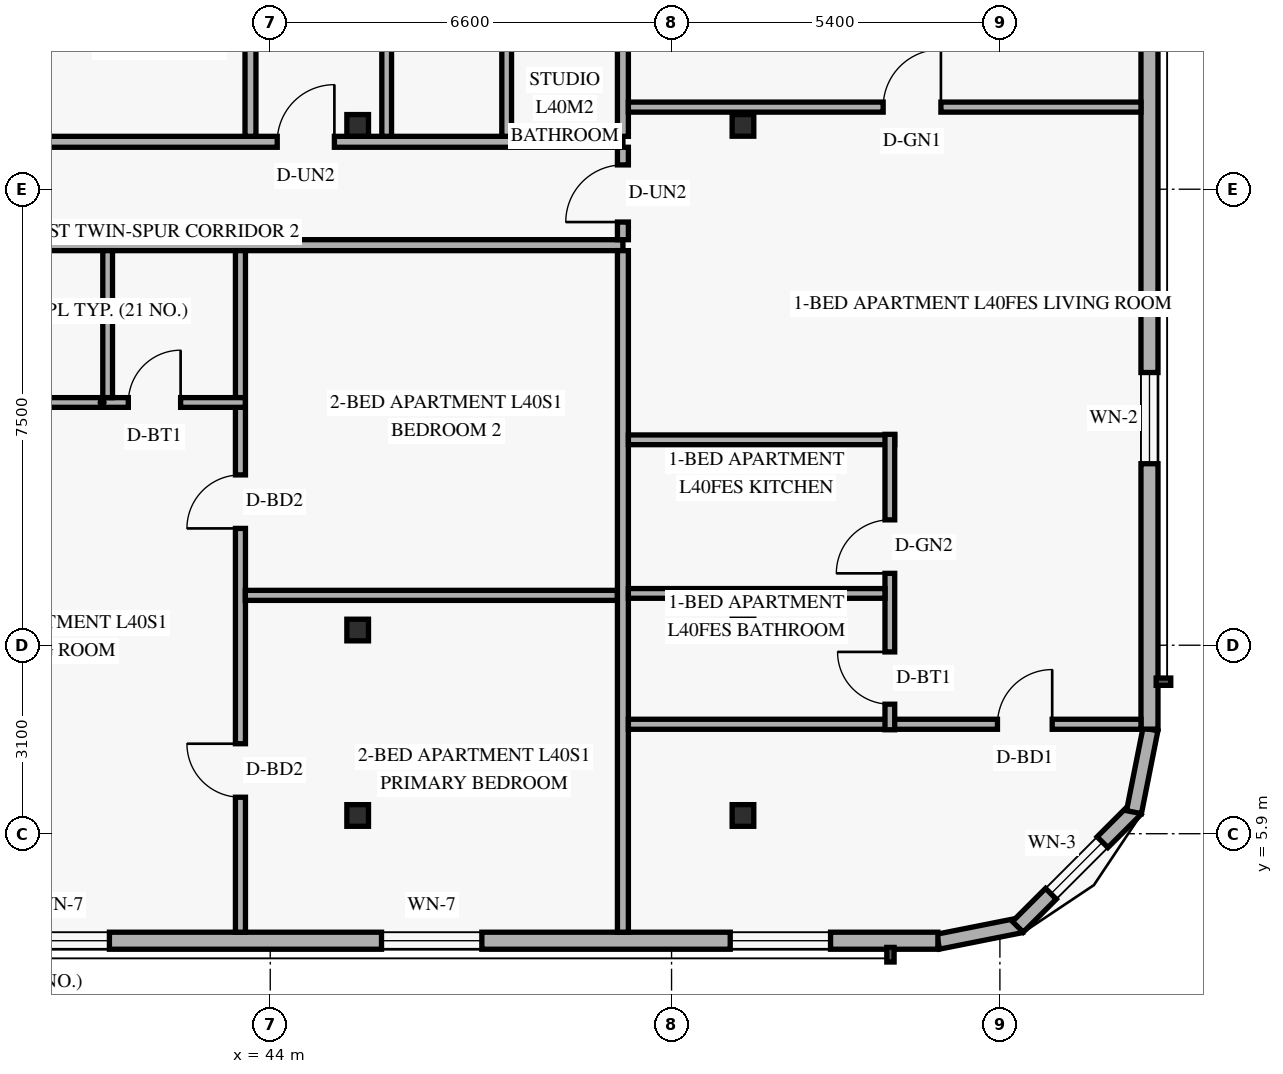
"""IFC4 building model, lengths in metres.
Left out: names, types, materials, properties, quantities, classifications, styles, units other than length and angle.
Written with IfcOpenShell. Run it as: python <this file> out.ifc"""

import sys

from ifc_helpers import new_model, si_unit, direction, frame, frame_2d, origin, origin_2d, place, context, subcontext, project, spatial, rectangle, hollow_rectangle, extrude, element, fill, save


model = new_model("IFC4")
c1 = context("Model", 3, precision=1e-05, world=origin(), true_north=direction((0.0, 1.0)))
c2 = subcontext(c1, "Body", "Model", "MODEL_VIEW")
j1 = project(units=[si_unit("LENGTHUNIT", "METRE"), si_unit("PLANEANGLEUNIT", "RADIAN")], contexts=[c1])
p1 = place(None, origin())
s1 = spatial("IfcSite", under=j1, at=p1, CompositionType="ELEMENT")
p2 = place(p1, origin())
s2 = spatial("IfcBuilding", under=s1, at=p2, CompositionType="ELEMENT")
p3 = place(p2, frame((0.0, 0.0, 155.4)))
s3 = spatial("IfcBuildingStorey", under=s2, at=p3, CompositionType="ELEMENT", Elevation=155.4)
for number, where, z_axis, x_axis in (
    (1, (45.375, 6.2, 0.0), (0.035, 0.0, 0.999), (0.0, 1.0, 0.0)),
    (2, (45.375, 9.25, 0.0), (0.035, 0.0, 0.999), (0.0, 1.0, 0.0)),
    (3, (45.375, 17.55, 0.0), (0.035, 0.0, 0.999), (0.0, 1.0, 0.0)),
):
    element("IfcColumn", number, at=place(p3, frame(where, z_axis=z_axis, x_axis=x_axis)), inside=s3, PredefinedType="COLUMN", context=c2, shape_type="SweptSolid", body=[
        extrude(hollow_rectangle(XDim=0.356, YDim=0.356, WallThickness=0.016, at=origin_2d()), origin(), (0.0, 0.0, 1.0), 3.602),
    ])
for number, where, z_axis, x_axis in (
    (4, (51.67, 6.2, 0.0), (0.058, 0.0, 0.998), (0.0, 1.0, 0.0)),
    (5, (51.67, 9.25, 0.0), (0.058, 0.0, 0.998), (0.0, 1.0, 0.0)),
    (6, (51.67, 17.55, 0.0), (0.058, 0.0, 0.998), (0.0, 1.0, 0.0)),
):
    element("IfcColumn", number, at=place(p3, frame(where, z_axis=z_axis, x_axis=x_axis)), inside=s3, PredefinedType="COLUMN", context=c2, shape_type="SweptSolid", body=[
        extrude(hollow_rectangle(XDim=0.356, YDim=0.356, WallThickness=0.016, at=origin_2d()), origin(), (0.0, 0.0, 1.0), 3.606),
    ])
p4 = place(p3, frame((54.983, 4.124, 0.0), z_axis=(0.0, 0.0, 1.0), x_axis=(0.980809899341, 0.19496651342, 0.0)))
e7 = element("IfcWall", 7, at=p4, inside=s3, PredefinedType="SOLIDWALL", context=c2, shape_type="SweptSolid", body=[
    extrude(rectangle(XDim=1.389, YDim=0.25, at=frame_2d((0.694, 0.0))), origin(), (0.0, 0.0, 1.0), 3.36),
])
p5 = place(p3, frame((56.295, 4.368, 0.0), z_axis=(0.0, 0.0, 1.0), x_axis=(0.707106781187, 0.707106781187, 0.0)))
e8 = element("IfcWall", 8, at=p5, inside=s3, PredefinedType="SOLIDWALL", context=c2, shape_type="SweptSolid", body=[
    extrude(rectangle(XDim=2.739, YDim=0.25, at=frame_2d((1.37, 0.0))), origin(), (0.0, 0.0, 1.0), 3.36),
])
p6 = place(p5, frame((0.77, 0.0, 0.85)))
e9 = element("IfcOpeningElement", 9, at=p6, cuts=e8, PredefinedType="OPENING", context=c2, shape_type="SweptSolid", body=[
    extrude(rectangle(XDim=1.2, YDim=1.5, at=frame_2d((0.6, 0.75))), frame((0.0, 0.135, 0.0), z_axis=(0.0, -1.0, 0.0), x_axis=(1.0, 0.0, 0.0)), (0.0, 0.0, 1.0), 0.27),
])
p7 = place(p3, frame((58.205, 6.254, 0.0), z_axis=(0.0, 0.0, 1.0), x_axis=(0.19496651342, 0.980809899341, 0.0)))
e10 = element("IfcWall", 10, at=p7, inside=s3, PredefinedType="SOLIDWALL", context=c2, shape_type="SweptSolid", body=[
    extrude(rectangle(XDim=1.389, YDim=0.25, at=frame_2d((0.694, 0.0))), origin(), (0.0, 0.0, 1.0), 3.36),
])
p8 = place(p3, frame((21.22, 4.14, 0.0), z_axis=(0.0, 0.0, 1.0), x_axis=(1.0, 0.0, 0.0)))
e11 = element("IfcWall", 11, at=p8, inside=s3, PredefinedType="SOLIDWALL", context=c2, shape_type="SweptSolid", body=[
    extrude(rectangle(XDim=33.76, YDim=0.28, at=frame_2d((16.88, 0.0))), origin(), (0.0, 0.0, 1.0), 3.36),
])
p9 = place(p8, frame((1.98, 0.0, 0.85)))
e12 = element("IfcOpeningElement", 12, at=p9, cuts=e11, PredefinedType="OPENING", context=c2, shape_type="SweptSolid", body=[
    extrude(rectangle(XDim=1.65, YDim=1.6, at=frame_2d((0.825, 0.8))), frame((0.0, 0.15, 0.0), z_axis=(0.0, -1.0, 0.0), x_axis=(1.0, 0.0, 0.0)), (0.0, 0.0, 1.0), 0.3),
])
p10 = place(p8, frame((8.865, 0.0, 0.85)))
e13 = element("IfcOpeningElement", 13, at=p10, cuts=e11, PredefinedType="OPENING", context=c2, shape_type="SweptSolid", body=[
    extrude(rectangle(XDim=1.65, YDim=1.6, at=frame_2d((0.825, 0.8))), frame((0.0, 0.15, 0.0), z_axis=(0.0, -1.0, 0.0), x_axis=(1.0, 0.0, 0.0)), (0.0, 0.0, 1.0), 0.3),
])
p11 = place(p8, frame((14.665, 0.0, 0.85)))
e14 = element("IfcOpeningElement", 14, at=p11, cuts=e11, PredefinedType="OPENING", context=c2, shape_type="SweptSolid", body=[
    extrude(rectangle(XDim=1.2, YDim=1.5, at=frame_2d((0.6, 0.75))), frame((0.0, 0.15, 0.0), z_axis=(0.0, -1.0, 0.0), x_axis=(1.0, 0.0, 0.0)), (0.0, 0.0, 1.0), 0.3),
])
p12 = place(p8, frame((18.485, 0.0, 0.85)))
e15 = element("IfcOpeningElement", 15, at=p12, cuts=e11, PredefinedType="OPENING", context=c2, shape_type="SweptSolid", body=[
    extrude(rectangle(XDim=1.65, YDim=1.6, at=frame_2d((0.825, 0.8))), frame((0.0, 0.15, 0.0), z_axis=(0.0, -1.0, 0.0), x_axis=(1.0, 0.0, 0.0)), (0.0, 0.0, 1.0), 0.3),
])
p13 = place(p8, frame((24.61, 0.0, 0.85)))
e16 = element("IfcOpeningElement", 16, at=p13, cuts=e11, PredefinedType="OPENING", context=c2, shape_type="SweptSolid", body=[
    extrude(rectangle(XDim=1.65, YDim=1.6, at=frame_2d((0.825, 0.8))), frame((0.0, 0.15, 0.0), z_axis=(0.0, -1.0, 0.0), x_axis=(1.0, 0.0, 0.0)), (0.0, 0.0, 1.0), 0.3),
])
p14 = place(p8, frame((30.345, 0.0, 0.85)))
e17 = element("IfcOpeningElement", 17, at=p14, cuts=e11, PredefinedType="OPENING", context=c2, shape_type="SweptSolid", body=[
    extrude(rectangle(XDim=1.65, YDim=1.6, at=frame_2d((0.825, 0.8))), frame((0.0, 0.15, 0.0), z_axis=(0.0, -1.0, 0.0), x_axis=(1.0, 0.0, 0.0)), (0.0, 0.0, 1.0), 0.3),
])
p15 = place(p3, frame((58.46, 7.62, 0.0), z_axis=(0.0, 0.0, 1.0), x_axis=(0.0, 1.0, 0.0)))
e18 = element("IfcWall", 18, at=p15, inside=s3, PredefinedType="SOLIDWALL", context=c2, shape_type="SweptSolid", body=[
    extrude(rectangle(XDim=15.83, YDim=0.28, at=frame_2d((7.915, 0.0))), origin(), (0.0, 0.0, 1.0), 3.36),
])
p16 = place(p15, frame((4.365, 0.0, 0.85)))
e19 = element("IfcOpeningElement", 19, at=p16, cuts=e18, PredefinedType="OPENING", context=c2, shape_type="SweptSolid", body=[
    extrude(rectangle(XDim=1.5, YDim=1.55, at=frame_2d((0.75, 0.775))), frame((0.0, 0.15, 0.0), z_axis=(0.0, -1.0, 0.0), x_axis=(1.0, 0.0, 0.0)), (0.0, 0.0, 1.0), 0.3),
])
p17 = place(p15, frame((12.28, 0.0, 0.85)))
e20 = element("IfcOpeningElement", 20, at=p17, cuts=e18, PredefinedType="OPENING", context=c2, shape_type="SweptSolid", body=[
    extrude(rectangle(XDim=1.5, YDim=1.55, at=frame_2d((0.75, 0.775))), frame((0.0, 0.15, 0.0), z_axis=(0.0, -1.0, 0.0), x_axis=(1.0, 0.0, 0.0)), (0.0, 0.0, 1.0), 0.3),
])
p18 = place(p3, frame((37.633, 15.58, 0.0), z_axis=(0.0, 0.0, 1.0), x_axis=(1.0, 0.0, 0.0)))
e21 = element("IfcWall", 21, at=p18, inside=s3, PredefinedType="STANDARD", context=c2, shape_type="SweptSolid", body=[
    extrude(rectangle(XDim=12.167, YDim=0.18, at=frame_2d((6.084, 0.0))), origin(), (0.0, 0.0, 1.0), 2.73),
])
p19 = place(p18, frame((0.188, 0.0, 0.0)))
e22 = element("IfcOpeningElement", 22, at=p19, cuts=e21, PredefinedType="OPENING", context=c2, shape_type="SweptSolid", body=[
    extrude(rectangle(XDim=0.94, YDim=2.15, at=frame_2d((0.47, 1.075))), frame((0.0, 0.1, 0.0), z_axis=(0.0, -1.0, 0.0), x_axis=(1.0, 0.0, 0.0)), (0.0, 0.0, 1.0), 0.2),
])
p20 = place(p3, frame((37.64, 17.28, 0.0), z_axis=(0.0, 0.0, 1.0), x_axis=(1.0, 0.0, 0.0)))
e23 = element("IfcWall", 23, at=p20, inside=s3, PredefinedType="STANDARD", context=c2, shape_type="SweptSolid", body=[
    extrude(rectangle(XDim=12.16, YDim=0.18, at=frame_2d((6.08, 0.0))), origin(), (0.0, 0.0, 1.0), 2.73),
])
p21 = place(p20, frame((6.475, 0.0, 0.0)))
e24 = element("IfcOpeningElement", 24, at=p21, cuts=e23, PredefinedType="OPENING", context=c2, shape_type="SweptSolid", body=[
    extrude(rectangle(XDim=0.94, YDim=2.15, at=frame_2d((0.47, 1.075))), frame((0.0, 0.1, 0.0), z_axis=(0.0, -1.0, 0.0), x_axis=(1.0, 0.0, 0.0)), (0.0, 0.0, 1.0), 0.2),
])
p22 = place(p3, frame((43.51, 4.28, 0.0), z_axis=(0.0, 0.0, 1.0), x_axis=(0.0, 1.0, 0.0)))
e25 = element("IfcWall", 25, at=p22, inside=s3, PredefinedType="PARTITIONING", context=c2, shape_type="SweptSolid", body=[
    extrude(rectangle(XDim=11.21, YDim=0.165, at=frame_2d((5.605, 0.0))), origin(), (0.0, 0.0, 1.0), 2.73),
])
p23 = place(p22, frame((2.22, 0.0, 0.0)))
e26 = element("IfcOpeningElement", 26, at=p23, cuts=e25, PredefinedType="OPENING", context=c2, shape_type="SweptSolid", body=[
    extrude(rectangle(XDim=0.88, YDim=2.14, at=frame_2d((0.44, 1.07))), frame((0.0, 0.093, 0.0), z_axis=(0.0, -1.0, 0.0), x_axis=(1.0, 0.0, 0.0)), (0.0, 0.0, 1.0), 0.185),
])
p24 = place(p22, frame((6.641, 0.0, 0.0)))
e27 = element("IfcOpeningElement", 27, at=p24, cuts=e25, PredefinedType="OPENING", context=c2, shape_type="SweptSolid", body=[
    extrude(rectangle(XDim=0.88, YDim=2.14, at=frame_2d((0.44, 1.07))), frame((0.0, 0.093, 0.0), z_axis=(0.0, -1.0, 0.0), x_axis=(1.0, 0.0, 0.0)), (0.0, 0.0, 1.0), 0.185),
])
p25 = place(p3, frame((38.88, 12.992, 0.0), z_axis=(0.0, 0.0, 1.0), x_axis=(1.0, 0.0, 0.0)))
e28 = element("IfcWall", 28, at=p25, inside=s3, PredefinedType="PLUMBINGWALL", context=c2, shape_type="SweptSolid", body=[
    extrude(rectangle(XDim=4.71, YDim=0.16, at=frame_2d((2.355, 0.0))), origin(), (0.0, 0.0, 1.0), 3.36),
])
p26 = place(p25, frame((0.38, 0.0, 0.0)))
e29 = element("IfcOpeningElement", 29, at=p26, cuts=e28, PredefinedType="OPENING", context=c2, shape_type="SweptSolid", body=[
    extrude(rectangle(XDim=0.88, YDim=2.12, at=frame_2d((0.44, 1.06))), frame((0.0, 0.09, 0.0), z_axis=(0.0, -1.0, 0.0), x_axis=(1.0, 0.0, 0.0)), (0.0, 0.0, 1.0), 0.18),
])
p27 = place(p25, frame((2.786, 0.0, 0.0)))
e30 = element("IfcOpeningElement", 30, at=p27, cuts=e28, PredefinedType="OPENING", context=c2, shape_type="SweptSolid", body=[
    extrude(rectangle(XDim=0.86, YDim=2.12, at=frame_2d((0.43, 1.06))), frame((0.0, 0.09, 0.0), z_axis=(0.0, -1.0, 0.0), x_axis=(1.0, 0.0, 0.0)), (0.0, 0.0, 1.0), 0.18),
])
p28 = place(p3, frame((41.326, 13.073, 0.0), z_axis=(0.0, 0.0, 1.0), x_axis=(0.0, 1.0, 0.0)))
e31 = element("IfcWall", 31, at=p28, inside=s3, PredefinedType="PLUMBINGWALL", context=c2, shape_type="SweptSolid", body=[
    extrude(rectangle(XDim=2.417, YDim=0.16, at=frame_2d((1.209, 0.0))), origin(), (0.0, 0.0, 1.0), 2.984),
])
p29 = place(p3, frame((43.59, 9.82, 0.0), z_axis=(0.0, 0.0, 1.0), x_axis=(1.0, 0.0, 0.0)))
e32 = element("IfcWall", 32, at=p29, inside=s3, PredefinedType="PARTITIONING", context=c2, shape_type="SweptSolid", body=[
    extrude(rectangle(XDim=6.12, YDim=0.165, at=frame_2d((3.06, 0.0))), origin(), (0.0, 0.0, 1.0), 2.73),
])
p30 = place(p3, frame((43.675, 17.37, 0.0), z_axis=(0.0, 0.0, 1.0), x_axis=(0.0, 1.0, 0.0)))
e33 = element("IfcWall", 33, at=p30, inside=s3, PredefinedType="PARTITIONING", context=c2, shape_type="SweptSolid", body=[
    extrude(rectangle(XDim=10.1, YDim=0.18, at=frame_2d((5.05, 0.0))), origin(), (0.0, 0.0, 1.0), 2.73),
])
p31 = place(p3, frame((45.915, 17.37, 0.0), z_axis=(0.0, 0.0, 1.0), x_axis=(0.0, 1.0, 0.0)))
e34 = element("IfcWall", 34, at=p31, inside=s3, PredefinedType="PLUMBINGWALL", context=c2, shape_type="SweptSolid", body=[
    extrude(rectangle(XDim=2.43, YDim=0.16, at=frame_2d((1.215, 0.0))), origin(), (0.0, 0.0, 1.0), 2.73),
])
p32 = place(p3, frame((47.888, 17.37, 0.0), z_axis=(0.0, 0.0, 1.0), x_axis=(0.0, 1.0, 0.0)))
e35 = element("IfcWall", 35, at=p32, inside=s3, PredefinedType="PLUMBINGWALL", context=c2, shape_type="SweptSolid", body=[
    extrude(rectangle(XDim=2.27, YDim=0.16, at=frame_2d((1.135, 0.0))), origin(), (0.0, 0.0, 1.0), 2.73),
])
p33 = place(p3, frame((49.8, 15.67, 0.0), z_axis=(0.0, 0.0, 1.0), x_axis=(0.0, 1.0, 0.0)))
e36 = element("IfcWall", 36, at=p33, inside=s3, PredefinedType="STANDARD", context=c2, shape_type="SweptSolid", body=[
    extrude(rectangle(XDim=1.52, YDim=0.18, at=frame_2d((0.76, 0.0))), origin(), (0.0, 0.0, 1.0), 3.36),
])
p34 = place(p33, frame((0.29, 0.0, 0.0)))
e37 = element("IfcOpeningElement", 37, at=p34, cuts=e36, PredefinedType="OPENING", context=c2, shape_type="SweptSolid", body=[
    extrude(rectangle(XDim=0.94, YDim=2.15, at=frame_2d((0.47, 1.075))), frame((0.0, 0.1, 0.0), z_axis=(0.0, -1.0, 0.0), x_axis=(1.0, 0.0, 0.0)), (0.0, 0.0, 1.0), 0.2),
])
p35 = place(p3, frame((49.8, 4.28, 0.0), z_axis=(0.0, 0.0, 1.0), x_axis=(0.0, 1.0, 0.0)))
e38 = element("IfcWall", 38, at=p35, inside=s3, PredefinedType="PARTITIONING", context=c2, shape_type="SweptSolid", body=[
    extrude(rectangle(XDim=11.21, YDim=0.18, at=frame_2d((5.605, 0.0))), origin(), (0.0, 0.0, 1.0), 2.73),
])
p36 = place(p3, frame((49.8, 17.37, 0.0), z_axis=(0.0, 0.0, 1.0), x_axis=(0.0, 1.0, 0.0)))
e39 = element("IfcWall", 39, at=p36, inside=s3, PredefinedType="PARTITIONING", context=c2, shape_type="SweptSolid", body=[
    extrude(rectangle(XDim=10.1, YDim=0.18, at=frame_2d((5.05, 0.0))), origin(), (0.0, 0.0, 1.0), 2.73),
])
p37 = place(p3, frame((49.89, 7.7, 0.0), z_axis=(0.0, 0.0, 1.0), x_axis=(1.0, 0.0, 0.0)))
e40 = element("IfcWall", 40, at=p37, inside=s3, PredefinedType="PARTITIONING", context=c2, shape_type="SweptSolid", body=[
    extrude(rectangle(XDim=8.43, YDim=0.165, at=frame_2d((4.215, 0.0))), origin(), (0.0, 0.0, 1.0), 2.879),
])
p38 = place(p37, frame((6.07, 0.0, 0.0)))
e41 = element("IfcOpeningElement", 41, at=p38, cuts=e40, PredefinedType="OPENING", context=c2, shape_type="SweptSolid", body=[
    extrude(rectangle(XDim=0.9, YDim=2.14, at=frame_2d((0.45, 1.07))), frame((0.0, 0.093, 0.0), z_axis=(0.0, -1.0, 0.0), x_axis=(1.0, 0.0, 0.0)), (0.0, 0.0, 1.0), 0.185),
])
p39 = place(p3, frame((49.89, 12.378, 0.0), z_axis=(0.0, 0.0, 1.0), x_axis=(1.0, 0.0, 0.0)))
e42 = element("IfcWall", 42, at=p39, inside=s3, PredefinedType="PLUMBINGWALL", context=c2, shape_type="SweptSolid", body=[
    extrude(rectangle(XDim=4.38, YDim=0.16, at=frame_2d((2.19, 0.0))), origin(), (0.0, 0.0, 1.0), 2.879),
])
p40 = place(p3, frame((54.19, 7.61, 0.0), z_axis=(0.0, 0.0, 1.0), x_axis=(0.0, 1.0, 0.0)))
e43 = element("IfcWall", 43, at=p40, inside=s3, PredefinedType="PLUMBINGWALL", context=c2, shape_type="SweptSolid", body=[
    extrude(rectangle(XDim=4.858, YDim=0.16, at=frame_2d((2.429, 0.0))), origin(), (0.0, 0.0, 1.0), 3.36),
])
p41 = place(p40, frame((0.42, 0.0, 0.0)))
e44 = element("IfcOpeningElement", 44, at=p41, cuts=e43, PredefinedType="OPENING", context=c2, shape_type="SweptSolid", body=[
    extrude(rectangle(XDim=0.86, YDim=2.12, at=frame_2d((0.43, 1.06))), frame((0.0, 0.09, 0.0), z_axis=(0.0, -1.0, 0.0), x_axis=(1.0, 0.0, 0.0)), (0.0, 0.0, 1.0), 0.18),
])
p42 = place(p40, frame((2.572, 0.0, 0.0)))
e45 = element("IfcOpeningElement", 45, at=p42, cuts=e43, PredefinedType="OPENING", context=c2, shape_type="SweptSolid", body=[
    extrude(rectangle(XDim=0.88, YDim=2.12, at=frame_2d((0.44, 1.06))), frame((0.0, 0.09, 0.0), z_axis=(0.0, -1.0, 0.0), x_axis=(1.0, 0.0, 0.0)), (0.0, 0.0, 1.0), 0.18),
])
p43 = place(p3, frame((49.89, 9.852, 0.0), z_axis=(0.0, 0.0, 1.0), x_axis=(1.0, 0.0, 0.0)))
e46 = element("IfcWall", 46, at=p43, inside=s3, PredefinedType="PLUMBINGWALL", context=c2, shape_type="SweptSolid", body=[
    extrude(rectangle(XDim=4.22, YDim=0.16, at=frame_2d((2.11, 0.0))), origin(), (0.0, 0.0, 1.0), 2.879),
])
p44 = place(p3, frame((49.89, 17.851, 0.0), z_axis=(0.0, 0.0, 1.0), x_axis=(1.0, 0.0, 0.0)))
e47 = element("IfcWall", 47, at=p44, inside=s3, PredefinedType="PARTITIONING", context=c2, shape_type="SweptSolid", body=[
    extrude(rectangle(XDim=8.43, YDim=0.165, at=frame_2d((4.215, 0.0))), origin(), (0.0, 0.0, 1.0), 2.879),
])
p45 = place(p44, frame((4.19, 0.0, 0.0)))
e48 = element("IfcOpeningElement", 48, at=p45, cuts=e47, PredefinedType="OPENING", context=c2, shape_type="SweptSolid", body=[
    extrude(rectangle(XDim=0.95, YDim=2.15, at=frame_2d((0.475, 1.075))), frame((0.0, 0.093, 0.0), z_axis=(0.0, -1.0, 0.0), x_axis=(1.0, 0.0, 0.0)), (0.0, 0.0, 1.0), 0.185),
])
p46 = place(p6, origin())
e49 = element("IfcWindow", 49, at=p46, inside=s3, PartitioningType="SINGLE_PANEL", PredefinedType="WINDOW", context=c2, shape_type="SweptSolid", body=[
    extrude(rectangle(XDim=1.2, YDim=1.5, at=frame_2d((0.6, 0.75))), frame((0.0, 0.03, 0.0), z_axis=(0.0, -1.0, 0.0), x_axis=(1.0, 0.0, 0.0)), (0.0, 0.0, 1.0), 0.06),
])
fill(e9, e49)
p47 = place(p12, origin())
e50 = element("IfcWindow", 50, at=p47, inside=s3, PartitioningType="SINGLE_PANEL", PredefinedType="WINDOW", context=c2, shape_type="SweptSolid", body=[
    extrude(rectangle(XDim=1.65, YDim=1.6, at=frame_2d((0.825, 0.8))), frame((0.0, 0.03, 0.0), z_axis=(0.0, -1.0, 0.0), x_axis=(1.0, 0.0, 0.0)), (0.0, 0.0, 1.0), 0.06),
])
fill(e15, e50)
p48 = place(p13, origin())
e51 = element("IfcWindow", 51, at=p48, inside=s3, PartitioningType="SINGLE_PANEL", PredefinedType="WINDOW", context=c2, shape_type="SweptSolid", body=[
    extrude(rectangle(XDim=1.65, YDim=1.6, at=frame_2d((0.825, 0.8))), frame((0.0, 0.03, 0.0), z_axis=(0.0, -1.0, 0.0), x_axis=(1.0, 0.0, 0.0)), (0.0, 0.0, 1.0), 0.06),
])
fill(e16, e51)
p49 = place(p14, origin())
e52 = element("IfcWindow", 52, at=p49, inside=s3, PartitioningType="SINGLE_PANEL", PredefinedType="WINDOW", context=c2, shape_type="SweptSolid", body=[
    extrude(rectangle(XDim=1.65, YDim=1.6, at=frame_2d((0.825, 0.8))), frame((0.0, 0.03, 0.0), z_axis=(0.0, -1.0, 0.0), x_axis=(1.0, 0.0, 0.0)), (0.0, 0.0, 1.0), 0.06),
])
fill(e17, e52)
p50 = place(p16, origin())
e53 = element("IfcWindow", 53, at=p50, inside=s3, PartitioningType="SINGLE_PANEL", PredefinedType="WINDOW", context=c2, shape_type="SweptSolid", body=[
    extrude(rectangle(XDim=1.5, YDim=1.55, at=frame_2d((0.75, 0.775))), frame((0.0, 0.03, 0.0), z_axis=(0.0, -1.0, 0.0), x_axis=(1.0, 0.0, 0.0)), (0.0, 0.0, 1.0), 0.06),
])
fill(e19, e53)
p51 = place(p27, origin())
e54 = element("IfcDoor", 54, at=p51, inside=s3, OperationType="SINGLE_SWING_RIGHT", PredefinedType="DOOR", context=c2, shape_type="SweptSolid", body=[
    extrude(rectangle(XDim=0.86, YDim=2.12, at=frame_2d((0.43, 1.06))), frame((0.0, 0.025, 0.0), z_axis=(0.0, -1.0, 0.0), x_axis=(1.0, 0.0, 0.0)), (0.0, 0.0, 1.0), 0.05),
])
fill(e30, e54)
p52 = place(p23, origin())
e55 = element("IfcDoor", 55, at=p52, inside=s3, OperationType="SINGLE_SWING_RIGHT", PredefinedType="DOOR", context=c2, shape_type="SweptSolid", body=[
    extrude(rectangle(XDim=0.88, YDim=2.14, at=frame_2d((0.44, 1.07))), frame((0.0, 0.025, 0.0), z_axis=(0.0, -1.0, 0.0), x_axis=(1.0, 0.0, 0.0)), (0.0, 0.0, 1.0), 0.05),
])
fill(e26, e55)
p53 = place(p24, origin())
e56 = element("IfcDoor", 56, at=p53, inside=s3, OperationType="SINGLE_SWING_LEFT", PredefinedType="DOOR", context=c2, shape_type="SweptSolid", body=[
    extrude(rectangle(XDim=0.88, YDim=2.14, at=frame_2d((0.44, 1.07))), frame((0.0, 0.025, 0.0), z_axis=(0.0, -1.0, 0.0), x_axis=(1.0, 0.0, 0.0)), (0.0, 0.0, 1.0), 0.05),
])
fill(e27, e56)
p54 = place(p21, origin())
e57 = element("IfcDoor", 57, at=p54, inside=s3, OperationType="SINGLE_SWING_RIGHT", PredefinedType="DOOR", context=c2, shape_type="SweptSolid", body=[
    extrude(rectangle(XDim=0.94, YDim=2.15, at=frame_2d((0.47, 1.075))), frame((0.0, 0.025, 0.0), z_axis=(0.0, -1.0, 0.0), x_axis=(1.0, 0.0, 0.0)), (0.0, 0.0, 1.0), 0.05),
])
fill(e24, e57)
p55 = place(p45, origin())
e58 = element("IfcDoor", 58, at=p55, inside=s3, OperationType="SINGLE_SWING_RIGHT", PredefinedType="DOOR", context=c2, shape_type="SweptSolid", body=[
    extrude(rectangle(XDim=0.95, YDim=2.15, at=frame_2d((0.475, 1.075))), frame((0.0, 0.025, 0.0), z_axis=(0.0, -1.0, 0.0), x_axis=(1.0, 0.0, 0.0)), (0.0, 0.0, 1.0), 0.05),
])
fill(e48, e58)
p56 = place(p34, origin())
e59 = element("IfcDoor", 59, at=p56, inside=s3, OperationType="SINGLE_SWING_LEFT", PredefinedType="DOOR", context=c2, shape_type="SweptSolid", body=[
    extrude(rectangle(XDim=0.94, YDim=2.15, at=frame_2d((0.47, 1.075))), frame((0.0, 0.025, 0.0), z_axis=(0.0, -1.0, 0.0), x_axis=(1.0, 0.0, 0.0)), (0.0, 0.0, 1.0), 0.05),
])
fill(e37, e59)
p57 = place(p41, origin())
e60 = element("IfcDoor", 60, at=p57, inside=s3, OperationType="SINGLE_SWING_RIGHT", PredefinedType="DOOR", context=c2, shape_type="SweptSolid", body=[
    extrude(rectangle(XDim=0.86, YDim=2.12, at=frame_2d((0.43, 1.06))), frame((0.0, 0.025, 0.0), z_axis=(0.0, -1.0, 0.0), x_axis=(1.0, 0.0, 0.0)), (0.0, 0.0, 1.0), 0.05),
])
fill(e44, e60)
p58 = place(p42, origin())
e61 = element("IfcDoor", 61, at=p58, inside=s3, OperationType="SINGLE_SWING_LEFT", PredefinedType="DOOR", context=c2, shape_type="SweptSolid", body=[
    extrude(rectangle(XDim=0.88, YDim=2.12, at=frame_2d((0.44, 1.06))), frame((0.0, 0.025, 0.0), z_axis=(0.0, -1.0, 0.0), x_axis=(1.0, 0.0, 0.0)), (0.0, 0.0, 1.0), 0.05),
])
fill(e45, e61)
p59 = place(p38, origin())
e62 = element("IfcDoor", 62, at=p59, inside=s3, OperationType="SINGLE_SWING_RIGHT", PredefinedType="DOOR", context=c2, shape_type="SweptSolid", body=[
    extrude(rectangle(XDim=0.9, YDim=2.14, at=frame_2d((0.45, 1.07))), frame((0.0, 0.025, 0.0), z_axis=(0.0, -1.0, 0.0), x_axis=(1.0, 0.0, 0.0)), (0.0, 0.0, 1.0), 0.05),
])
fill(e41, e62)
save(model, sys.argv[1])
